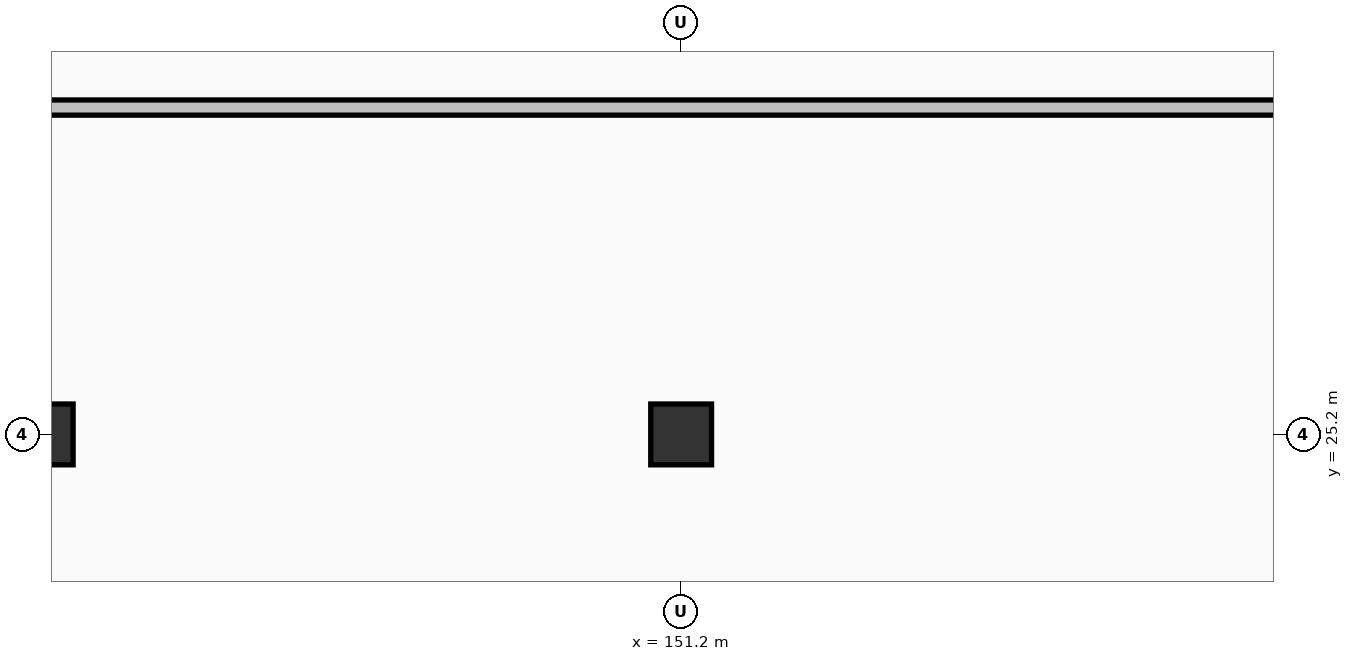
"""IFC4 building model, lengths in metres.
Left out: names, types, materials, properties, quantities, classifications, styles, units other than length and angle.
Written with IfcOpenShell. Run it as: python <this file> out.ifc"""

import sys

from ifc_helpers import new_model, si_unit, direction, frame, frame_2d, origin, origin_2d, place, context, subcontext, project, spatial, rectangle, extrude, element, save


model = new_model("IFC4")
c1 = context("Model", 3, precision=1e-05, world=origin(), true_north=direction((0.0, 1.0)))
c2 = subcontext(c1, "Body", "Model", "MODEL_VIEW")
j1 = project(units=[si_unit("LENGTHUNIT", "METRE"), si_unit("PLANEANGLEUNIT", "RADIAN")], contexts=[c1])
p1 = place(None, origin())
s1 = spatial("IfcSite", under=j1, at=p1, CompositionType="ELEMENT")
p2 = place(p1, origin())
s2 = spatial("IfcBuilding", under=s1, at=p2, CompositionType="ELEMENT")
p3 = place(p2, frame((0.0, 0.0, -4.2)))
s3 = spatial("IfcBuildingStorey", under=s2, at=p3, CompositionType="ELEMENT", Elevation=-4.2)
for number, where, z_axis, x_axis in (
    (1, (142.8, 25.2, 0.0), (0.0, 0.0, 1.0), (1.0, 0.0, 0.0)),
    (2, (151.2, 25.2, 0.0), (0.0, 0.0, 1.0), (1.0, 0.0, 0.0)),
):
    element("IfcColumn", number, at=place(p3, frame(where, z_axis=z_axis, x_axis=x_axis)), inside=s3, PredefinedType="COLUMN", context=c2, shape_type="SweptSolid", body=[
        extrude(rectangle(XDim=0.8, YDim=0.8, at=origin_2d()), origin(), (0.0, 0.0, 1.0), 4.2),
    ])
p4 = place(p3, frame((91.8, 29.5, 0.0), z_axis=(0.0, 0.0, 1.0), x_axis=(1.0, 0.0, 0.0)))
e3 = element("IfcWall", 3, at=p4, inside=s3, PredefinedType="SOLIDWALL", context=c2, shape_type="SweptSolid", body=[
    extrude(rectangle(XDim=68.4, YDim=0.2, at=frame_2d((34.2, 0.0))), origin(), (0.0, 0.0, 1.0), 3.85),
])
p5 = place(p4, frame((14.0, 0.0, 0.0)))
e4 = element("IfcOpeningElement", 4, at=p5, cuts=e3, PredefinedType="OPENING", context=c2, shape_type="SweptSolid", body=[
    extrude(rectangle(XDim=1.65, YDim=2.25, at=frame_2d((0.825, 1.125))), frame((0.0, 0.11, 0.0), z_axis=(0.0, -1.0, 0.0), x_axis=(1.0, 0.0, 0.0)), (0.0, 0.0, 1.0), 0.22),
])
p6 = place(p4, frame((48.0, 0.0, 0.0)))
e5 = element("IfcOpeningElement", 5, at=p6, cuts=e3, PredefinedType="OPENING", context=c2, shape_type="SweptSolid", body=[
    extrude(rectangle(XDim=1.65, YDim=2.25, at=frame_2d((0.825, 1.125))), frame((0.0, 0.11, 0.0), z_axis=(0.0, -1.0, 0.0), x_axis=(1.0, 0.0, 0.0)), (0.0, 0.0, 1.0), 0.22),
])
save(model, sys.argv[1])
